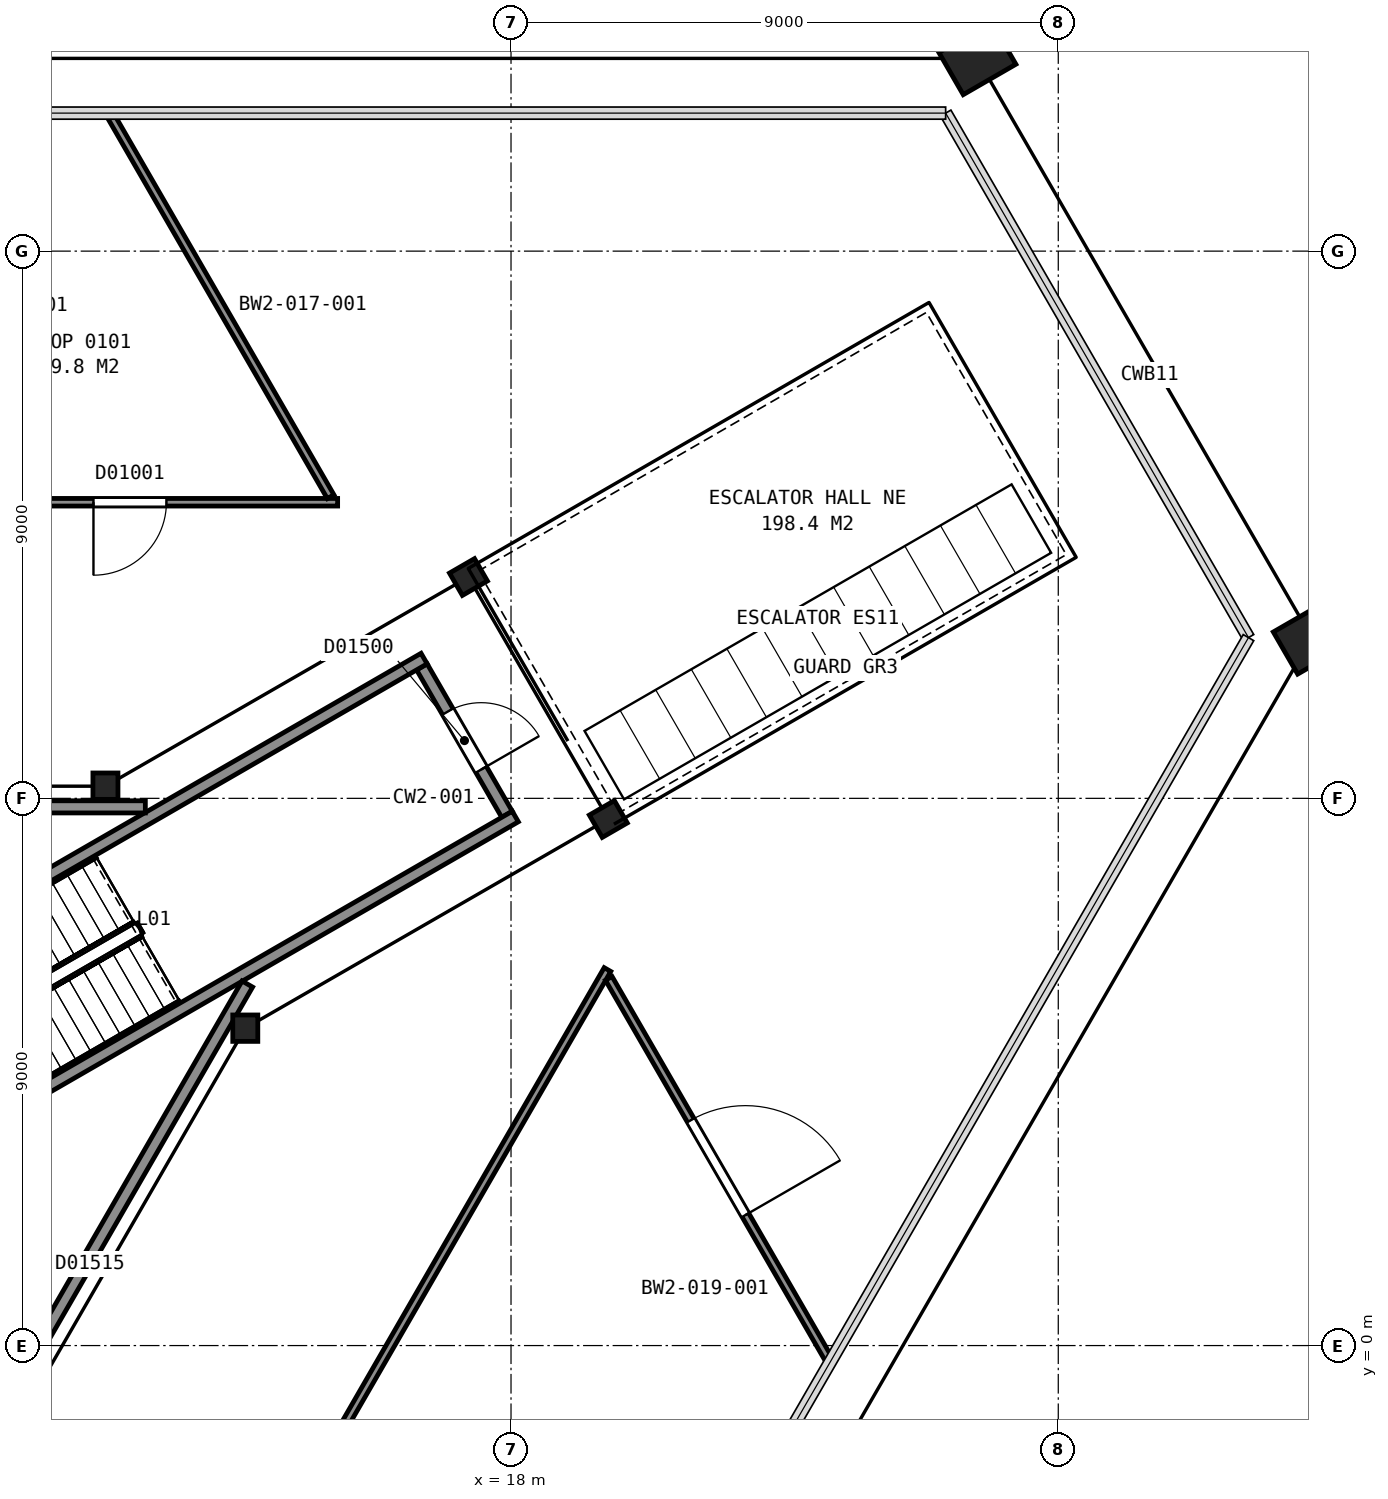
"""IFC4 building model, lengths in metres.
Left out: names, types, materials, properties, quantities, classifications, styles, units other than length and angle.
Written with IfcOpenShell. Run it as: python <this file> out.ifc"""

import sys

from ifc_helpers import new_model, si_unit, direction, frame, frame_2d, origin, origin_2d, place, context, subcontext, project, spatial, rectangle, hollow_rectangle, i_section, extrude, element, fill, save


model = new_model("IFC4")
c1 = context("Model", 3, precision=1e-05, world=origin(), true_north=direction((0.0, 1.0)))
c2 = subcontext(c1, "Body", "Model", "MODEL_VIEW")
j1 = project(units=[si_unit("LENGTHUNIT", "METRE"), si_unit("PLANEANGLEUNIT", "RADIAN")], contexts=[c1])
p1 = place(None, origin())
s1 = spatial("IfcSite", under=j1, at=p1, CompositionType="ELEMENT")
p2 = place(p1, origin())
s2 = spatial("IfcBuilding", under=s1, at=p2, CompositionType="ELEMENT")
p3 = place(p2, frame((0.0, 0.0, 12.0)))
s3 = spatial("IfcBuildingStorey", under=s2, at=p3, CompositionType="ELEMENT", Elevation=12.0)
for number, where, z_axis, x_axis in (
    (1, (25.67, 21.17, 0.0), (0.0, 0.0, 1.0), (0.5, -0.866, 0.0)),
    (2, (31.17, 11.64, 0.0), (0.0, 0.0, 1.0), (0.5, -0.866, 0.0)),
):
    element("IfcColumn", number, at=place(p3, frame(where, z_axis=z_axis, x_axis=x_axis)), inside=s3, PredefinedType="COLUMN", context=c2, shape_type="SweptSolid", body=[
        extrude(hollow_rectangle(XDim=0.8, YDim=1.0, WallThickness=0.075, at=origin_2d()), origin(), (0.0, 0.0, 1.0), 5.4),
    ])
p4 = place(p3, frame((13.63, 5.22, 0.0), z_axis=(0.0, 0.0, 1.0), x_axis=(1.0, 0.0, 0.0)))
e3 = element("IfcColumn", 3, at=p4, inside=s3, PredefinedType="COLUMN", context=c2, shape_type="SweptSolid", body=[
    extrude(i_section(OverallWidth=0.411, OverallDepth=0.434, WebThickness=0.036, FlangeThickness=0.057, FilletRadius=0.015, at=origin_2d()), origin(), (0.0, 0.0, 1.0), 5.4),
])
for number, where, z_axis, x_axis in (
    (4, (19.6, 8.66, 0.0), (0.0, 0.0, 1.0), (0.5, -0.866, 0.0)),
    (5, (17.3, 12.64, 0.0), (0.0, 0.0, 1.0), (0.5, -0.866, 0.0)),
):
    element("IfcColumn", number, at=place(p3, frame(where, z_axis=z_axis, x_axis=x_axis)), inside=s3, PredefinedType="COLUMN", context=c2, shape_type="SweptSolid", body=[
        extrude(i_section(OverallWidth=0.424, OverallDepth=0.475, WebThickness=0.048, FlangeThickness=0.077, FilletRadius=0.015, at=origin_2d()), origin(), (0.0, 0.0, 1.0), 5.4),
    ])
p5 = place(p3, frame((11.33, 9.2, 0.0), z_axis=(0.0, 0.0, 1.0), x_axis=(1.0, 0.0, 0.0)))
e6 = element("IfcColumn", 6, at=p5, inside=s3, PredefinedType="COLUMN", context=c2, shape_type="SweptSolid", body=[
    extrude(i_section(OverallWidth=0.411, OverallDepth=0.434, WebThickness=0.036, FlangeThickness=0.057, FilletRadius=0.015, at=origin_2d()), origin(), (0.0, 0.0, 1.0), 5.4),
])
p6 = place(p3, frame((17.934, 8.738, 0.0), z_axis=(0.0, 0.0, 1.0), x_axis=(-0.49998411664, 0.866034573852, 0.0)))
e7 = element("IfcWall", 7, at=p6, inside=s3, PredefinedType="PARTITIONING", context=c2, shape_type="SweptSolid", body=[
    extrude(rectangle(XDim=2.8, YDim=0.2, at=frame_2d((1.4, 0.0))), origin(), (0.0, 0.0, 1.0), 5.15),
])
p7 = place(p6, frame((0.85, 0.0, 0.0)))
e8 = element("IfcOpeningElement", 8, at=p7, cuts=e7, PredefinedType="OPENING", context=c2, shape_type="SweptSolid", body=[
    extrude(rectangle(XDim=1.1, YDim=2.1, at=frame_2d((0.55, 1.05))), frame((0.0, 0.11, 0.0), z_axis=(0.0, -1.0, 0.0), x_axis=(1.0, 0.0, 0.0)), (0.0, 0.0, 1.0), 0.22),
])
for number, where, z_axis, x_axis in (
    (9, (6.178, 5.299, 0.0), (0.0, 0.0, 1.0), (0.866, 0.5, 0.0)),
    (10, (7.678, 2.701, 0.0), (0.0, 0.0, 1.0), (0.866, 0.5, 0.0)),
):
    element("IfcWall", number, at=place(p3, frame(where, z_axis=z_axis, x_axis=x_axis)), inside=s3, PredefinedType="PARTITIONING", context=c2, shape_type="SweptSolid", body=[
        extrude(rectangle(XDim=12.0, YDim=0.2, at=frame_2d((6.0, 0.0))), origin(), (0.0, 0.0, 1.0), 5.15),
    ])
p8 = place(p3, frame((11.986, 8.86, 0.0), z_axis=(0.0, 0.0, 1.0), x_axis=(-1.0, 0.0, 0.0)))
e11 = element("IfcWall", 11, at=p8, inside=s3, PredefinedType="PARTITIONING", context=c2, shape_type="SweptSolid", body=[
    extrude(rectangle(XDim=23.967, YDim=0.2, at=frame_2d((11.983, 0.0))), origin(), (0.0, 0.0, 1.0), 5.15),
])
p9 = place(p8, frame((7.596, 0.0, 0.0)))
e12 = element("IfcOpeningElement", 12, at=p9, cuts=e11, PredefinedType="OPENING", context=c2, shape_type="SweptSolid", body=[
    extrude(rectangle(XDim=1.8, YDim=2.1, at=frame_2d((0.9, 1.05))), frame((0.0, 0.11, 0.0), z_axis=(0.0, -1.0, 0.0), x_axis=(1.0, 0.0, 0.0)), (0.0, 0.0, 1.0), 0.22),
])
p10 = place(p3, frame((1.68, -14.811, 0.0), z_axis=(0.0, 0.0, 1.0), x_axis=(0.499994327219, 0.866028678941, 0.0)))
e13 = element("IfcWall", 13, at=p10, inside=s3, PredefinedType="PARTITIONING", context=c2, shape_type="SweptSolid", body=[
    extrude(rectangle(XDim=23.968, YDim=0.2, at=frame_2d((11.984, 0.0))), origin(), (0.0, 0.0, 1.0), 5.15),
])
p11 = place(p10, frame((13.44, 0.0, 0.0)))
e14 = element("IfcOpeningElement", 14, at=p11, cuts=e13, PredefinedType="OPENING", context=c2, shape_type="SweptSolid", body=[
    extrude(rectangle(XDim=1.8, YDim=2.1, at=frame_2d((0.9, 1.05))), frame((0.0, 0.11, 0.0), z_axis=(0.0, -1.0, 0.0), x_axis=(1.0, 0.0, 0.0)), (0.0, 0.0, 1.0), 0.22),
])
p12 = place(p3, frame((-15.148, 13.87, 0.0), z_axis=(0.0, 0.0, 1.0), x_axis=(1.0, 0.0, 0.0)))
e15 = element("IfcWall", 15, at=p12, inside=s3, PredefinedType="PARTITIONING", context=c2, shape_type="SweptSolid", body=[
    extrude(rectangle(XDim=30.297, YDim=0.125, at=frame_2d((15.148, 0.0))), origin(), (0.0, 0.0, 1.0), 4.253),
])
p13 = place(p12, frame((26.281, 0.0, 0.0)))
e16 = element("IfcOpeningElement", 16, at=p13, cuts=e15, PredefinedType="OPENING", context=c2, shape_type="SweptSolid", body=[
    extrude(rectangle(XDim=1.2, YDim=2.1, at=frame_2d((0.6, 1.05))), frame((0.0, 0.073, 0.0), z_axis=(0.0, -1.0, 0.0), x_axis=(1.0, 0.0, 0.0)), (0.0, 0.0, 1.0), 0.145),
])
p14 = place(p12, frame((14.265, 0.0, 0.0)))
e17 = element("IfcOpeningElement", 17, at=p14, cuts=e15, PredefinedType="OPENING", context=c2, shape_type="SweptSolid", body=[
    extrude(rectangle(XDim=1.8, YDim=2.4, at=frame_2d((0.9, 1.2))), frame((0.0, 0.073, 0.0), z_axis=(0.0, -1.0, 0.0), x_axis=(1.0, 0.0, 0.0)), (0.0, 0.0, 1.0), 0.145),
])
p15 = place(p12, frame((2.812, 0.0, 0.0)))
e18 = element("IfcOpeningElement", 18, at=p15, cuts=e15, PredefinedType="OPENING", context=c2, shape_type="SweptSolid", body=[
    extrude(rectangle(XDim=1.2, YDim=2.1, at=frame_2d((0.6, 1.05))), frame((0.0, 0.073, 0.0), z_axis=(0.0, -1.0, 0.0), x_axis=(1.0, 0.0, 0.0)), (0.0, 0.0, 1.0), 0.145),
])
p16 = place(p3, frame((19.586, 6.184, 0.0), z_axis=(0.0, 0.0, 1.0), x_axis=(-0.499994028088, -0.866028851642, 0.0)))
e19 = element("IfcWall", 19, at=p16, inside=s3, PredefinedType="PARTITIONING", context=c2, shape_type="SweptSolid", body=[
    extrude(rectangle(XDim=30.297, YDim=0.125, at=frame_2d((15.148, 0.0))), origin(), (0.0, 0.0, 1.0), 4.253),
])
p17 = place(p16, frame((26.285, 0.0, 0.0)))
e20 = element("IfcOpeningElement", 20, at=p17, cuts=e19, PredefinedType="OPENING", context=c2, shape_type="SweptSolid", body=[
    extrude(rectangle(XDim=1.2, YDim=2.1, at=frame_2d((0.6, 1.05))), frame((0.0, 0.073, 0.0), z_axis=(0.0, -1.0, 0.0), x_axis=(1.0, 0.0, 0.0)), (0.0, 0.0, 1.0), 0.145),
])
p18 = place(p16, frame((18.732, 0.0, 0.0)))
e21 = element("IfcOpeningElement", 21, at=p18, cuts=e19, PredefinedType="OPENING", context=c2, shape_type="SweptSolid", body=[
    extrude(rectangle(XDim=1.2, YDim=2.1, at=frame_2d((0.6, 1.05))), frame((0.0, 0.073, 0.0), z_axis=(0.0, -1.0, 0.0), x_axis=(1.0, 0.0, 0.0)), (0.0, 0.0, 1.0), 0.145),
])
p19 = place(p3, frame((11.391, 20.27, 0.0), z_axis=(0.0, 0.0, 1.0), x_axis=(0.499977739203, -0.86603825568, 0.0)))
e22 = element("IfcWall", 22, at=p19, inside=s3, PredefinedType="PARTITIONING", context=c2, shape_type="SweptSolid", body=[
    extrude(rectangle(XDim=7.285, YDim=0.125, at=frame_2d((3.643, 0.0))), origin(), (0.0, 0.0, 1.0), 5.24),
])
p20 = place(p3, frame((23.25, -0.27, 0.0), z_axis=(0.0, 0.0, 1.0), x_axis=(-0.500002873931, 0.866023744513, 0.0)))
e23 = element("IfcWall", 23, at=p20, inside=s3, PredefinedType="PARTITIONING", context=c2, shape_type="SweptSolid", body=[
    extrude(rectangle(XDim=7.285, YDim=0.125, at=frame_2d((3.643, 0.0))), origin(), (0.0, 0.0, 1.0), 5.24),
])
p21 = place(p20, frame((2.79, 0.0, 0.0)))
e24 = element("IfcOpeningElement", 24, at=p21, cuts=e23, PredefinedType="OPENING", context=c2, shape_type="SweptSolid", body=[
    extrude(rectangle(XDim=1.8, YDim=2.4, at=frame_2d((0.9, 1.2))), frame((0.0, 0.073, 0.0), z_axis=(0.0, -1.0, 0.0), x_axis=(1.0, 0.0, 0.0)), (0.0, 0.0, 1.0), 0.145),
])
p22 = place(p7, origin())
e25 = element("IfcDoor", 25, at=p22, inside=s3, OperationType="SINGLE_SWING_LEFT", PredefinedType="DOOR", context=c2, shape_type="SweptSolid", body=[
    extrude(rectangle(XDim=1.1, YDim=2.1, at=frame_2d((0.55, 1.05))), frame((0.0, 0.025, 0.0), z_axis=(0.0, -1.0, 0.0), x_axis=(1.0, 0.0, 0.0)), (0.0, 0.0, 1.0), 0.05),
])
fill(e8, e25)
p23 = place(p13, origin())
e26 = element("IfcDoor", 26, at=p23, inside=s3, OperationType="SINGLE_SWING_LEFT", PredefinedType="DOOR", context=c2, shape_type="SweptSolid", body=[
    extrude(rectangle(XDim=1.2, YDim=2.1, at=frame_2d((0.6, 1.05))), frame((0.0, 0.025, 0.0), z_axis=(0.0, -1.0, 0.0), x_axis=(1.0, 0.0, 0.0)), (0.0, 0.0, 1.0), 0.05),
])
fill(e16, e26)
p24 = place(p21, origin())
e27 = element("IfcDoor", 27, at=p24, inside=s3, OperationType="DOUBLE_DOOR_SINGLE_SWING", PredefinedType="DOOR", context=c2, shape_type="SweptSolid", body=[
    extrude(rectangle(XDim=1.8, YDim=2.4, at=frame_2d((0.9, 1.2))), frame((0.0, 0.025, 0.0), z_axis=(0.0, -1.0, 0.0), x_axis=(1.0, 0.0, 0.0)), (0.0, 0.0, 1.0), 0.05),
])
fill(e24, e27)
save(model, sys.argv[1])
